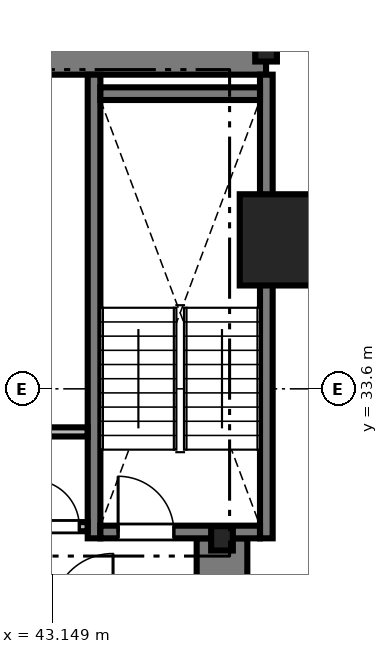
"""IFC4 building model, lengths in metres.
Left out: names, types, materials, properties, quantities, classifications, styles, units other than length and angle.
Written with IfcOpenShell. Run it as: python <this file> out.ifc"""

import sys

from ifc_helpers import new_model, si_unit, direction, frame, frame_2d, origin, origin_2d, place, context, subcontext, project, spatial, rectangle, i_section, extrude, source, transform, mapped, element, fill, save


model = new_model("IFC4")
c1 = context("Model", 3, precision=1e-05, world=origin(), true_north=direction((0.0, 1.0)))
c2 = subcontext(c1, "Body", "Model", "MODEL_VIEW")
j1 = project(units=[si_unit("LENGTHUNIT", "METRE"), si_unit("PLANEANGLEUNIT", "RADIAN")], contexts=[c1])
p1 = place(None, origin())
s1 = spatial("IfcSite", under=j1, at=p1, CompositionType="ELEMENT")
p2 = place(p1, origin())
s2 = spatial("IfcBuilding", under=s1, at=p2, CompositionType="ELEMENT")
p3 = place(p2, frame((0.0, 0.0, 34.9)))
s3 = spatial("IfcBuildingStorey", under=s2, at=p3, CompositionType="ELEMENT", Elevation=34.9)
m1 = source(origin(), c2, "Body", "SweptSolid", [
    extrude(rectangle(XDim=17.52, YDim=1.0, at=frame_2d((8.76, 0.0))), origin(), (0.0, 0.0, 1.0), 3.41),
])
p4 = place(p3, frame((29.85, 40.3, 0.0), z_axis=(0.0, 0.0, 1.0), x_axis=(1.0, 0.0, 0.0)))
e1 = element("IfcWall", 1, at=p4, inside=s3, PredefinedType="SHEAR", context=c2, shape_type="MappedRepresentation", body=[
    mapped(m1, transform((0.0, 0.0, 0.0), scale=1.0)),
])
m2 = source(origin(), c2, "Body", "SweptSolid", [
    extrude(rectangle(XDim=13.15, YDim=1.0, at=frame_2d((6.575, 0.0))), origin(), (0.0, 0.0, 1.0), 3.41),
])
p5 = place(p3, frame((46.5, 17.5, 0.0), z_axis=(0.0, 0.0, 1.0), x_axis=(0.0, 1.0, 0.0)))
e2 = element("IfcWall", 2, at=p5, inside=s3, PredefinedType="SHEAR", context=c2, shape_type="MappedRepresentation", body=[
    mapped(m2, transform((0.0, 0.0, 0.0), scale=1.0)),
])
m3 = source(origin(), c2, "Body", "SweptSolid", [
    extrude(i_section(OverallWidth=0.428, OverallDepth=0.481, WebThickness=0.04, FlangeThickness=0.063, FilletRadius=0.015, at=origin_2d()), origin(), (0.0, 0.0, 1.0), 3.41),
])
for number, where, z_axis, x_axis in (
    (3, (46.5, 30.65, 0.0), (0.0, 0.0, 1.0), (1.0, 0.0, 0.0)),
    (4, (47.37, 40.3, 0.0), (0.0, 0.0, 1.0), (1.0, 0.0, 0.0)),
):
    element("IfcColumn", number, at=place(p3, frame(where, z_axis=z_axis, x_axis=x_axis)), inside=s3, PredefinedType="COLUMN", context=c2, shape_type="MappedRepresentation", body=[
        mapped(m3, transform((0.0, 0.0, 0.0), scale=1.0)),
    ])
m4 = source(origin(), c2, "Body", "SweptSolid", [
    extrude(rectangle(XDim=1.8, YDim=1.8, at=origin_2d()), origin(), (0.0, 0.0, 1.0), 3.41),
])
p6 = place(p3, frame((47.75, 36.54, 0.0), z_axis=(0.0, 0.0, 1.0), x_axis=(1.0, 0.0, 0.0)))
e5 = element("IfcColumn", 5, at=p6, inside=s3, PredefinedType="COLUMN", context=c2, shape_type="MappedRepresentation", body=[
    mapped(m4, transform((0.0, 0.0, 0.0), scale=1.0)),
])
m5 = source(origin(), c2, "Body", "SweptSolid", [
    extrude(rectangle(XDim=9.15, YDim=0.25, at=frame_2d((4.575, 0.0))), origin(), (0.0, 0.0, 1.0), 3.45),
])
for number, where, z_axis, x_axis in (
    (6, (43.975, 30.65, 0.0), (0.0, 0.0, 1.0), (0.0, 1.0, 0.0)),
    (7, (47.375, 30.65, 0.0), (0.0, 0.0, 1.0), (0.0, 1.0, 0.0)),
):
    element("IfcWall", number, at=place(p3, frame(where, z_axis=z_axis, x_axis=x_axis)), inside=s3, PredefinedType="SOLIDWALL", context=c2, shape_type="MappedRepresentation", body=[
        mapped(m5, transform((0.0, 0.0, 0.0), scale=1.0)),
    ])
m6 = source(origin(), c2, "Body", "SweptSolid", [
    extrude(rectangle(XDim=3.15, YDim=0.25, at=frame_2d((1.575, 0.0))), origin(), (0.0, 0.0, 1.0), 3.45),
])
p7 = place(p3, frame((44.1, 39.425, 0.0), z_axis=(0.0, 0.0, 1.0), x_axis=(1.0, 0.0, 0.0)))
e8 = element("IfcWall", 8, at=p7, inside=s3, PredefinedType="SOLIDWALL", context=c2, shape_type="MappedRepresentation", body=[
    mapped(m6, transform((0.0, 0.0, 0.0), scale=1.0)),
])
p8 = place(p3, frame((44.1, 30.775, 0.0), z_axis=(0.0, 0.0, 1.0), x_axis=(1.0, 0.0, 0.0)))
e9 = element("IfcWall", 9, at=p8, inside=s3, PredefinedType="SOLIDWALL", context=c2, shape_type="MappedRepresentation", body=[
    mapped(m6, transform((0.0, 0.0, 0.0), scale=1.0)),
])
m7 = source(origin(), c2, "Body", "SweptSolid", [
    extrude(rectangle(XDim=1.1, YDim=2.2, at=frame_2d((0.55, 1.1))), frame((0.0, 0.135, 0.0), z_axis=(0.0, -1.0, 0.0), x_axis=(1.0, 0.0, 0.0)), (0.0, 0.0, 1.0), 0.27),
])
p9 = place(p8, frame((0.35, 0.0, 0.0)))
e10 = element("IfcOpeningElement", 10, at=p9, cuts=e9, PredefinedType="OPENING", context=c2, shape_type="MappedRepresentation", body=[
    mapped(m7, transform((0.0, 0.0, 0.0), scale=1.0)),
])
m8 = source(origin(), c2, "Body", "SweptSolid", [
    extrude(rectangle(XDim=1.248, YDim=0.18, at=frame_2d((0.624, 0.0))), origin(), (0.0, 0.0, 1.0), 3.41),
])
p10 = place(p3, frame((42.6, 30.88, 0.0), z_axis=(0.0, 0.0, 1.0), x_axis=(1.0, 0.0, 0.0)))
e11 = element("IfcWall", 11, at=p10, inside=s3, PredefinedType="PARTITIONING", context=c2, shape_type="MappedRepresentation", body=[
    mapped(m8, transform((0.0, 0.0, 0.0), scale=1.0)),
])
m9 = source(origin(), c2, "Body", "SweptSolid", [
    extrude(rectangle(XDim=0.92, YDim=2.1, at=frame_2d((0.46, 1.05))), frame((0.0, 0.1, 0.0), z_axis=(0.0, -1.0, 0.0), x_axis=(1.0, 0.0, 0.0)), (0.0, 0.0, 1.0), 0.2),
])
p11 = place(p10, frame((0.164, 0.0, 0.0)))
e12 = element("IfcOpeningElement", 12, at=p11, cuts=e11, PredefinedType="OPENING", context=c2, shape_type="MappedRepresentation", body=[
    mapped(m9, transform((0.0, 0.0, 0.0), scale=1.0)),
])
m10 = source(origin(), c2, "Body", "SweptSolid", [
    extrude(rectangle(XDim=1.348, YDim=0.18, at=frame_2d((0.674, 0.0))), origin(), (0.0, 0.0, 1.0), 3.41),
])
p12 = place(p3, frame((42.5, 32.75, 0.0), z_axis=(0.0, 0.0, 1.0), x_axis=(1.0, 0.0, 0.0)))
e13 = element("IfcWall", 13, at=p12, inside=s3, PredefinedType="PARTITIONING", context=c2, shape_type="MappedRepresentation", body=[
    mapped(m10, transform((0.0, 0.0, 0.0), scale=1.0)),
])
m11 = source(origin(), c2, "Body", "SweptSolid", [
    extrude(rectangle(XDim=1.1, YDim=2.2, at=frame_2d((0.55, 1.1))), frame((0.0, 0.025, 0.0), z_axis=(0.0, -1.0, 0.0), x_axis=(1.0, 0.0, 0.0)), (0.0, 0.0, 1.0), 0.05),
])
p13 = place(p9, origin())
e14 = element("IfcDoor", 14, at=p13, inside=s3, OperationType="SINGLE_SWING_LEFT", PredefinedType="DOOR", context=c2, shape_type="MappedRepresentation", body=[
    mapped(m11, transform((0.0, 0.0, 0.0), scale=1.0)),
])
fill(e10, e14)
m12 = source(origin(), c2, "Body", "SweptSolid", [
    extrude(rectangle(XDim=0.92, YDim=2.1, at=frame_2d((0.46, 1.05))), frame((0.0, 0.025, 0.0), z_axis=(0.0, -1.0, 0.0), x_axis=(1.0, 0.0, 0.0)), (0.0, 0.0, 1.0), 0.05),
])
p14 = place(p11, origin())
e15 = element("IfcDoor", 15, at=p14, inside=s3, OperationType="SINGLE_SWING_LEFT", PredefinedType="DOOR", context=c2, shape_type="MappedRepresentation", body=[
    mapped(m12, transform((0.0, 0.0, 0.0), scale=1.0)),
])
fill(e12, e15)
save(model, sys.argv[1])
